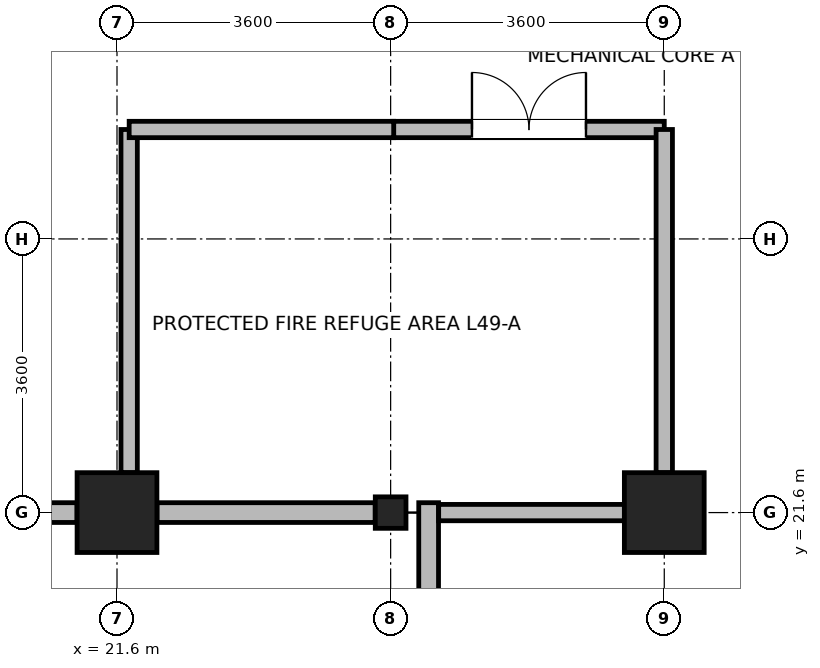
"""IFC4 building model, lengths in metres.
Left out: names, types, materials, properties, quantities, classifications, styles, units other than length and angle.
Written with IfcOpenShell. Run it as: python <this file> out.ifc"""

import sys

from ifc_helpers import new_model, si_unit, direction, frame, frame_2d, origin, origin_2d, place, context, subcontext, project, spatial, rectangle, i_section, extrude, source, transform, mapped, element, fill, save


model = new_model("IFC4")
c1 = context("Model", 3, precision=1e-05, world=origin(), true_north=direction((0.0, 1.0)))
c2 = subcontext(c1, "Body", "Model", "MODEL_VIEW")
j1 = project(units=[si_unit("LENGTHUNIT", "METRE"), si_unit("PLANEANGLEUNIT", "RADIAN")], contexts=[c1])
p1 = place(None, origin())
s1 = spatial("IfcSite", under=j1, at=p1, CompositionType="ELEMENT")
p2 = place(p1, origin())
s2 = spatial("IfcBuilding", under=s1, at=p2, CompositionType="ELEMENT")
p3 = place(p2, frame((0.0, 0.0, 192.0)))
s3 = spatial("IfcBuildingStorey", under=s2, at=p3, CompositionType="ELEMENT", Elevation=192.0)
m1 = source(origin(), c2, "Body", "SweptSolid", [
    extrude(rectangle(XDim=1.05, YDim=1.05, at=origin_2d()), origin(), (0.0, 0.0, 1.0), 5.2),
])
for number, where, z_axis, x_axis in (
    (1, (21.6, 21.6, 0.0), (0.0, 0.0, 1.0), (1.0, 0.0, 0.0)),
    (2, (28.8, 21.6, 0.0), (0.0, 0.0, 1.0), (1.0, 0.0, 0.0)),
):
    element("IfcColumn", number, at=place(p3, frame(where, z_axis=z_axis, x_axis=x_axis)), inside=s3, PredefinedType="COLUMN", context=c2, shape_type="MappedRepresentation", body=[
        mapped(m1, transform((0.0, 0.0, 0.0), x_axis=(1.0, 0.0, 0.0), y_axis=(0.0, 1.0, 0.0), z_axis=(0.0, 0.0, 1.0), scale=1.0)),
    ])
m2 = source(origin(), c2, "Body", "SweptSolid", [
    extrude(i_section(OverallWidth=0.404, OverallDepth=0.414, WebThickness=0.021, FlangeThickness=0.028, FilletRadius=0.015, at=origin_2d()), origin(), (0.0, 0.0, 1.0), 5.2),
])
p4 = place(p3, frame((25.2, 21.6, 0.0), z_axis=(0.0, 0.0, 1.0), x_axis=(1.0, 0.0, 0.0)))
e3 = element("IfcColumn", 3, at=p4, inside=s3, PredefinedType="COLUMN", context=c2, shape_type="MappedRepresentation", body=[
    mapped(m2, transform((0.0, 0.0, 0.0), x_axis=(1.0, 0.0, 0.0), y_axis=(0.0, 1.0, 0.0), z_axis=(0.0, 0.0, 1.0), scale=1.0)),
])
for number, where, z_axis, x_axis in (
    (4, (21.074, 21.6, 0.0), (0.0, 0.0, 1.0), (-1.0, 0.0, 0.0)),
    (5, (24.997, 21.6, 0.0), (0.0, 0.0, 1.0), (-1.0, 0.0, 0.0)),
):
    element("IfcWall", number, at=place(p3, frame(where, z_axis=z_axis, x_axis=x_axis)), inside=s3, PredefinedType="STANDARD", context=c2, shape_type="SweptSolid", body=[
        extrude(rectangle(XDim=2.871, YDim=0.26, at=frame_2d((1.436, 0.0))), origin(), (0.0, 0.0, 1.0), 2.96),
    ])
p5 = place(p3, frame((25.7, 1.67, 0.0), z_axis=(0.0, 0.0, 1.0), x_axis=(0.0, 1.0, 0.0)))
e6 = element("IfcWall", 6, at=p5, inside=s3, PredefinedType="STANDARD", context=c2, shape_type="SweptSolid", body=[
    extrude(rectangle(XDim=20.06, YDim=0.26, at=frame_2d((10.03, 0.0))), origin(), (0.0, 0.0, 1.0), 4.76),
])
p6 = place(p3, frame((25.24, 26.64, 0.0), z_axis=(0.0, 0.0, 1.0), x_axis=(1.0, 0.0, 0.0)))
e7 = element("IfcWall", 7, at=p6, inside=s3, PredefinedType="PARTITIONING", context=c2, shape_type="SweptSolid", body=[
    extrude(rectangle(XDim=3.56, YDim=0.215, at=frame_2d((1.78, 0.0))), origin(), (0.0, 0.0, 1.0), 4.76),
])
p7 = place(p6, frame((1.03, 0.0, 0.0)))
e8 = element("IfcOpeningElement", 8, at=p7, cuts=e7, PredefinedType="OPENING", context=c2, shape_type="SweptSolid", body=[
    extrude(rectangle(XDim=1.5, YDim=2.1, at=frame_2d((0.75, 1.05))), frame((0.0, 0.118, 0.0), z_axis=(0.0, -1.0, 0.0), x_axis=(1.0, 0.0, 0.0)), (0.0, 0.0, 1.0), 0.235),
])
p8 = place(p3, frame((25.832, 21.6, 0.0), z_axis=(0.0, 0.0, 1.0), x_axis=(1.0, 0.0, 0.0)))
e9 = element("IfcWall", 9, at=p8, inside=s3, PredefinedType="PARTITIONING", context=c2, shape_type="SweptSolid", body=[
    extrude(rectangle(XDim=2.443, YDim=0.215, at=frame_2d((1.221, 0.0))), origin(), (0.0, 0.0, 1.0), 2.96),
])
p9 = place(p3, frame((21.76, 22.125, 0.0), z_axis=(0.0, 0.0, 1.0), x_axis=(0.0, 1.0, 0.0)))
e10 = element("IfcWall", 10, at=p9, inside=s3, PredefinedType="PARTITIONING", context=c2, shape_type="SweptSolid", body=[
    extrude(rectangle(XDim=4.515, YDim=0.215, at=frame_2d((2.257, 0.0))), origin(), (0.0, 0.0, 1.0), 3.16),
])
p10 = place(p3, frame((28.8, 22.125, 0.0), z_axis=(0.0, 0.0, 1.0), x_axis=(0.0, 1.0, 0.0)))
e11 = element("IfcWall", 11, at=p10, inside=s3, PredefinedType="PARTITIONING", context=c2, shape_type="SweptSolid", body=[
    extrude(rectangle(XDim=4.515, YDim=0.215, at=frame_2d((2.257, 0.0))), origin(), (0.0, 0.0, 1.0), 2.96),
])
p11 = place(p3, frame((21.76, 26.64, 0.0), z_axis=(0.0, 0.0, 1.0), x_axis=(1.0, 0.0, 0.0)))
e12 = element("IfcWall", 12, at=p11, inside=s3, PredefinedType="PARTITIONING", context=c2, shape_type="SweptSolid", body=[
    extrude(rectangle(XDim=3.48, YDim=0.215, at=frame_2d((1.74, 0.0))), origin(), (0.0, 0.0, 1.0), 4.76),
])
p12 = place(p7, origin())
e13 = element("IfcDoor", 13, at=p12, inside=s3, OperationType="DOUBLE_DOOR_SINGLE_SWING", PredefinedType="DOOR", context=c2, shape_type="SweptSolid", body=[
    extrude(rectangle(XDim=1.5, YDim=2.1, at=frame_2d((0.75, 1.05))), frame((0.0, 0.025, 0.0), z_axis=(0.0, -1.0, 0.0), x_axis=(1.0, 0.0, 0.0)), (0.0, 0.0, 1.0), 0.05),
])
fill(e8, e13)
save(model, sys.argv[1])
